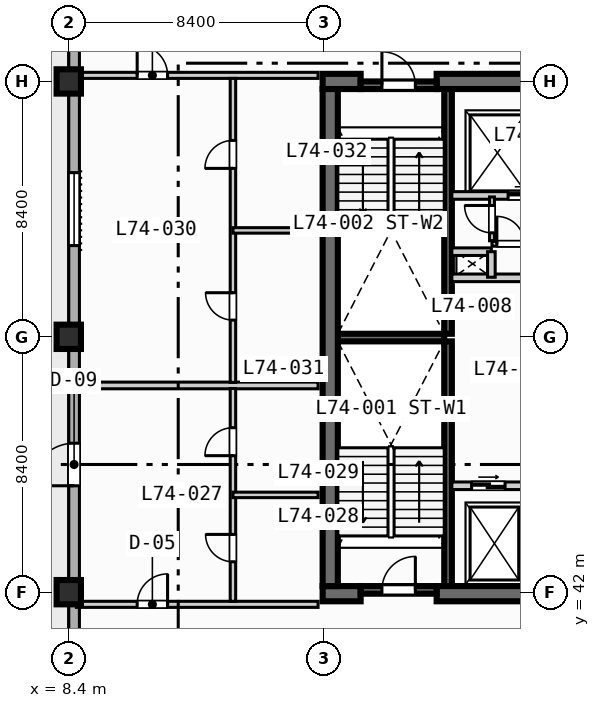
"""IFC4 building model, lengths in metres.
Left out: names, types, materials, properties, quantities, classifications, styles, units other than length and angle.
Written with IfcOpenShell. Run it as: python <this file> out.ifc"""

import sys

from ifc_helpers import new_model, si_unit, direction, frame, frame_2d, origin, origin_2d, place, context, subcontext, project, spatial, rectangle, extrude, element, fill, save


model = new_model("IFC4")
c1 = context("Model", 3, precision=1e-05, world=origin(), true_north=direction((0.0, 1.0)))
c2 = subcontext(c1, "Body", "Model", "MODEL_VIEW")
j1 = project(units=[si_unit("LENGTHUNIT", "METRE"), si_unit("PLANEANGLEUNIT", "RADIAN")], contexts=[c1])
p1 = place(None, origin())
s1 = spatial("IfcSite", under=j1, at=p1, CompositionType="ELEMENT")
p2 = place(p1, origin())
s2 = spatial("IfcBuilding", under=s1, at=p2, CompositionType="ELEMENT")
p3 = place(p2, frame((0.0, 0.0, 300.8)))
s3 = spatial("IfcBuildingStorey", under=s2, at=p3, CompositionType="ELEMENT", Elevation=300.8)
for number, where, z_axis, x_axis in (
    (1, (20.875, 42.2, 0.0), (0.0, 0.0, 1.0), (0.0, 1.0, 0.0)),
    (2, (20.875, 50.5, 0.0), (0.0, 0.0, 1.0), (0.0, 1.0, 0.0)),
):
    element("IfcWall", number, at=place(p3, frame(where, z_axis=z_axis, x_axis=x_axis)), inside=s3, PredefinedType="SOLIDWALL", context=c2, shape_type="SweptSolid", body=[
        extrude(rectangle(XDim=8.05, YDim=0.25, at=frame_2d((4.025, 0.0))), origin(), (0.0, 0.0, 1.0), 3.67),
    ])
p4 = place(p3, frame((17.25, 50.375, 0.0), z_axis=(0.0, 0.0, 1.0), x_axis=(1.0, 0.0, 0.0)))
e3 = element("IfcWall", 3, at=p4, inside=s3, PredefinedType="SOLIDWALL", context=c2, shape_type="SweptSolid", body=[
    extrude(rectangle(XDim=3.5, YDim=0.25, at=frame_2d((1.75, 0.0))), origin(), (0.0, 0.0, 1.0), 3.67),
])
p5 = place(p3, frame((16.75, 41.95, 0.0), z_axis=(0.0, 0.0, 1.0), x_axis=(1.0, 0.0, 0.0)))
e4 = element("IfcWall", 4, at=p5, inside=s3, PredefinedType="SHEAR", context=c2, shape_type="SweptSolid", body=[
    extrude(rectangle(XDim=1.25, YDim=0.5, at=frame_2d((0.625, 0.0))), origin(), (0.0, 0.0, 1.0), 3.67),
])
p6 = place(p3, frame((20.5, 41.95, 0.0), z_axis=(0.0, 0.0, 1.0), x_axis=(1.0, 0.0, 0.0)))
e5 = element("IfcWall", 5, at=p6, inside=s3, PredefinedType="SHEAR", context=c2, shape_type="SweptSolid", body=[
    extrude(rectangle(XDim=4.95, YDim=0.5, at=frame_2d((2.475, 0.0))), origin(), (0.0, 0.0, 1.0), 3.67),
])
p7 = place(p3, frame((16.75, 58.8, 0.0), z_axis=(0.0, 0.0, 1.0), x_axis=(1.0, 0.0, 0.0)))
e6 = element("IfcWall", 6, at=p7, inside=s3, PredefinedType="SHEAR", context=c2, shape_type="SweptSolid", body=[
    extrude(rectangle(XDim=1.25, YDim=0.5, at=frame_2d((0.625, 0.0))), origin(), (0.0, 0.0, 1.0), 3.67),
])
p8 = place(p3, frame((20.5, 58.8, 0.0), z_axis=(0.0, 0.0, 1.0), x_axis=(1.0, 0.0, 0.0)))
e7 = element("IfcWall", 7, at=p8, inside=s3, PredefinedType="SHEAR", context=c2, shape_type="SweptSolid", body=[
    extrude(rectangle(XDim=4.95, YDim=0.5, at=frame_2d((2.475, 0.0))), origin(), (0.0, 0.0, 1.0), 3.67),
])
p9 = place(p3, frame((17.0, 42.2, 0.0), z_axis=(0.0, 0.0, 1.0), x_axis=(0.0, 1.0, 0.0)))
e8 = element("IfcWall", 8, at=p9, inside=s3, PredefinedType="SHEAR", context=c2, shape_type="SweptSolid", body=[
    extrude(rectangle(XDim=16.35, YDim=0.5, at=frame_2d((8.175, 0.0))), origin(), (0.0, 0.0, 1.0), 3.67),
])
for number, where, z_axis, x_axis in (
    (9, (8.4, 42.0, 0.0), (0.0, 0.0, 1.0), (1.0, 0.0, 0.0)),
    (10, (8.4, 50.4, 0.0), (0.0, 0.0, 1.0), (1.0, 0.0, 0.0)),
    (11, (8.4, 58.8, 0.0), (0.0, 0.0, 1.0), (1.0, 0.0, 0.0)),
):
    element("IfcColumn", number, at=place(p3, frame(where, z_axis=z_axis, x_axis=x_axis)), inside=s3, PredefinedType="COLUMN", context=c2, shape_type="SweptSolid", body=[
        extrude(rectangle(XDim=0.8, YDim=0.8, at=origin_2d()), origin(), (0.0, 0.0, 1.0), 3.9),
    ])
p10 = place(p3, frame((8.575, 11.575, 0.0), z_axis=(0.0, 0.0, 1.0), x_axis=(0.0, 1.0, 0.0)))
e12 = element("IfcWall", 12, at=p10, inside=s3, PredefinedType="STANDARD", context=c2, shape_type="SweptSolid", body=[
    extrude(rectangle(XDim=60.85, YDim=0.35, at=frame_2d((30.425, 0.0))), origin(), (0.0, 0.0, 1.0), 3.67),
])
p11 = place(p10, frame((33.925, 0.0, 0.0)))
e13 = element("IfcOpeningElement", 13, at=p11, cuts=e12, PredefinedType="OPENING", context=c2, shape_type="SweptSolid", body=[
    extrude(rectangle(XDim=1.4, YDim=2.2, at=frame_2d((0.7, 1.1))), frame((0.0, 0.185, 0.0), z_axis=(0.0, -1.0, 0.0), x_axis=(1.0, 0.0, 0.0)), (0.0, 0.0, 1.0), 0.37),
])
p12 = place(p10, frame((25.025, 0.0, 0.85)))
e14 = element("IfcOpeningElement", 14, at=p12, cuts=e12, PredefinedType="OPENING", context=c2, shape_type="SweptSolid", body=[
    extrude(rectangle(XDim=2.4, YDim=1.95, at=frame_2d((1.2, 0.975))), frame((0.0, 0.185, 0.0), z_axis=(0.0, -1.0, 0.0), x_axis=(1.0, 0.0, 0.0)), (0.0, 0.0, 1.0), 0.37),
])
p13 = place(p10, frame((41.825, 0.0, 0.85)))
e15 = element("IfcOpeningElement", 15, at=p13, cuts=e12, PredefinedType="OPENING", context=c2, shape_type="SweptSolid", body=[
    extrude(rectangle(XDim=2.4, YDim=1.95, at=frame_2d((1.2, 0.975))), frame((0.0, 0.185, 0.0), z_axis=(0.0, -1.0, 0.0), x_axis=(1.0, 0.0, 0.0)), (0.0, 0.0, 1.0), 0.37),
])
p14 = place(p3, frame((18.0, 42.075, 0.0), z_axis=(0.0, 0.0, 1.0), x_axis=(1.0, 0.0, 0.0)))
e16 = element("IfcWall", 16, at=p14, inside=s3, PredefinedType="SOLIDWALL", context=c2, shape_type="SweptSolid", body=[
    extrude(rectangle(XDim=2.5, YDim=0.25, at=frame_2d((1.25, 0.0))), origin(), (0.0, 0.0, 1.0), 3.67),
])
p15 = place(p14, frame((0.7, 0.0, 0.0)))
e17 = element("IfcOpeningElement", 17, at=p15, cuts=e16, PredefinedType="OPENING", context=c2, shape_type="SweptSolid", body=[
    extrude(rectangle(XDim=1.1, YDim=2.15, at=frame_2d((0.55, 1.075))), frame((0.0, 0.135, 0.0), z_axis=(0.0, -1.0, 0.0), x_axis=(1.0, 0.0, 0.0)), (0.0, 0.0, 1.0), 0.27),
])
p16 = place(p3, frame((18.0, 58.675, 0.0), z_axis=(0.0, 0.0, 1.0), x_axis=(1.0, 0.0, 0.0)))
e18 = element("IfcWall", 18, at=p16, inside=s3, PredefinedType="SOLIDWALL", context=c2, shape_type="SweptSolid", body=[
    extrude(rectangle(XDim=2.5, YDim=0.25, at=frame_2d((1.25, 0.0))), origin(), (0.0, 0.0, 1.0), 3.67),
])
p17 = place(p16, frame((0.7, 0.0, 0.0)))
e19 = element("IfcOpeningElement", 19, at=p17, cuts=e18, PredefinedType="OPENING", context=c2, shape_type="SweptSolid", body=[
    extrude(rectangle(XDim=1.1, YDim=2.15, at=frame_2d((0.55, 1.075))), frame((0.0, 0.135, 0.0), z_axis=(0.0, -1.0, 0.0), x_axis=(1.0, 0.0, 0.0)), (0.0, 0.0, 1.0), 0.27),
])
p18 = place(p3, frame((21.0, 45.5, 0.0), z_axis=(0.0, 0.0, 1.0), x_axis=(1.0, 0.0, 0.0)))
e20 = element("IfcWall", 20, at=p18, inside=s3, PredefinedType="SOLIDWALL", context=c2, shape_type="SweptSolid", body=[
    extrude(rectangle(XDim=4.15, YDim=0.25, at=frame_2d((2.075, 0.0))), origin(), (0.0, 0.0, 1.0), 3.67),
])
p19 = place(p18, frame((0.65, 0.0, 0.0)))
e21 = element("IfcOpeningElement", 21, at=p19, cuts=e20, PredefinedType="OPENING", context=c2, shape_type="SweptSolid", body=[
    extrude(rectangle(XDim=1.1, YDim=2.15, at=frame_2d((0.55, 1.075))), frame((0.0, 0.135, 0.0), z_axis=(0.0, -1.0, 0.0), x_axis=(1.0, 0.0, 0.0)), (0.0, 0.0, 1.0), 0.27),
])
p20 = place(p3, frame((21.0, 52.34, 0.0), z_axis=(0.0, 0.0, 1.0), x_axis=(1.0, 0.0, 0.0)))
e22 = element("IfcWall", 22, at=p20, inside=s3, PredefinedType="SOLIDWALL", context=c2, shape_type="SweptSolid", body=[
    extrude(rectangle(XDim=3.95, YDim=0.25, at=frame_2d((1.975, 0.0))), origin(), (0.0, 0.0, 1.0), 3.67),
])
p21 = place(p3, frame((21.0, 55.05, 0.0), z_axis=(0.0, 0.0, 1.0), x_axis=(1.0, 0.0, 0.0)))
e23 = element("IfcWall", 23, at=p21, inside=s3, PredefinedType="SOLIDWALL", context=c2, shape_type="SweptSolid", body=[
    extrude(rectangle(XDim=4.15, YDim=0.25, at=frame_2d((2.075, 0.0))), origin(), (0.0, 0.0, 1.0), 3.67),
])
p22 = place(p21, frame((1.85, 0.0, 0.0)))
e24 = element("IfcOpeningElement", 24, at=p22, cuts=e23, PredefinedType="OPENING", context=c2, shape_type="SweptSolid", body=[
    extrude(rectangle(XDim=1.1, YDim=2.15, at=frame_2d((0.55, 1.075))), frame((0.0, 0.135, 0.0), z_axis=(0.0, -1.0, 0.0), x_axis=(1.0, 0.0, 0.0)), (0.0, 0.0, 1.0), 0.27),
])
p23 = place(p3, frame((21.0, 53.2, 0.0), z_axis=(0.0, 0.0, 1.0), x_axis=(1.0, 0.0, 0.0)))
e25 = element("IfcWall", 25, at=p23, inside=s3, PredefinedType="SOLIDWALL", context=c2, shape_type="SweptSolid", body=[
    extrude(rectangle(XDim=1.3, YDim=0.25, at=frame_2d((0.65, 0.0))), origin(), (0.0, 0.0, 1.0), 3.67),
])
p24 = place(p3, frame((22.3, 52.36, 0.0), z_axis=(0.0, 0.0, 1.0), x_axis=(0.0, 1.0, 0.0)))
e26 = element("IfcWall", 26, at=p24, inside=s3, PredefinedType="SOLIDWALL", context=c2, shape_type="SweptSolid", body=[
    extrude(rectangle(XDim=0.84, YDim=0.25, at=frame_2d((0.42, 0.0))), origin(), (0.0, 0.0, 1.0), 3.67),
])
p25 = place(p3, frame((22.32, 53.56, 0.0), z_axis=(0.0, 0.0, 1.0), x_axis=(0.0, 1.0, 0.0)))
e27 = element("IfcWall", 27, at=p25, inside=s3, PredefinedType="PARTITIONING", context=c2, shape_type="SweptSolid", body=[
    extrude(rectangle(XDim=1.44, YDim=0.16, at=frame_2d((0.72, 0.0))), origin(), (0.0, 0.0, 1.0), 3.67),
])
p26 = place(p25, frame((0.26, 0.0, 0.0)))
e28 = element("IfcOpeningElement", 28, at=p26, cuts=e27, PredefinedType="OPENING", context=c2, shape_type="SweptSolid", body=[
    extrude(rectangle(XDim=0.9, YDim=2.1, at=frame_2d((0.45, 1.05))), frame((0.0, 0.09, 0.0), z_axis=(0.0, -1.0, 0.0), x_axis=(1.0, 0.0, 0.0)), (0.0, 0.0, 1.0), 0.18),
])
p27 = place(p3, frame((22.32, 53.46, 0.0), z_axis=(0.0, 0.0, 1.0), x_axis=(1.0, 0.0, 0.0)))
e29 = element("IfcWall", 29, at=p27, inside=s3, PredefinedType="PARTITIONING", context=c2, shape_type="SweptSolid", body=[
    extrude(rectangle(XDim=2.36, YDim=0.16, at=frame_2d((1.18, 0.0))), origin(), (0.0, 0.0, 1.0), 3.67),
])
p28 = place(p27, frame((0.16, 0.0, 0.0)))
e30 = element("IfcOpeningElement", 30, at=p28, cuts=e29, PredefinedType="OPENING", context=c2, shape_type="SweptSolid", body=[
    extrude(rectangle(XDim=0.9, YDim=2.1, at=frame_2d((0.45, 1.05))), frame((0.0, 0.09, 0.0), z_axis=(0.0, -1.0, 0.0), x_axis=(1.0, 0.0, 0.0)), (0.0, 0.0, 1.0), 0.18),
])
p29 = place(p3, frame((8.65, 41.6, 0.0), z_axis=(0.0, 0.0, 1.0), x_axis=(1.0, 0.0, 0.0)))
e31 = element("IfcWall", 31, at=p29, inside=s3, PredefinedType="PARTITIONING", context=c2, shape_type="SweptSolid", body=[
    extrude(rectangle(XDim=7.95, YDim=0.2, at=frame_2d((3.975, 0.0))), origin(), (0.0, 0.0, 1.0), 3.67),
])
p30 = place(p29, frame((2.0, 0.0, 0.0)))
e32 = element("IfcOpeningElement", 32, at=p30, cuts=e31, PredefinedType="OPENING", context=c2, shape_type="SweptSolid", body=[
    extrude(rectangle(XDim=1.0, YDim=2.15, at=frame_2d((0.5, 1.075))), frame((0.0, 0.11, 0.0), z_axis=(0.0, -1.0, 0.0), x_axis=(1.0, 0.0, 0.0)), (0.0, 0.0, 1.0), 0.22),
])
p31 = place(p3, frame((8.65, 59.0, 0.0), z_axis=(0.0, 0.0, 1.0), x_axis=(1.0, 0.0, 0.0)))
e33 = element("IfcWall", 33, at=p31, inside=s3, PredefinedType="PARTITIONING", context=c2, shape_type="SweptSolid", body=[
    extrude(rectangle(XDim=7.95, YDim=0.2, at=frame_2d((3.975, 0.0))), origin(), (0.0, 0.0, 1.0), 3.07),
])
p32 = place(p31, frame((2.0, 0.0, 0.0)))
e34 = element("IfcOpeningElement", 34, at=p32, cuts=e33, PredefinedType="OPENING", context=c2, shape_type="SweptSolid", body=[
    extrude(rectangle(XDim=1.0, YDim=2.15, at=frame_2d((0.5, 1.075))), frame((0.0, 0.11, 0.0), z_axis=(0.0, -1.0, 0.0), x_axis=(1.0, 0.0, 0.0)), (0.0, 0.0, 1.0), 0.22),
])
p33 = place(p3, frame((8.65, 48.8, 0.0), z_axis=(0.0, 0.0, 1.0), x_axis=(1.0, 0.0, 0.0)))
e35 = element("IfcWall", 35, at=p33, inside=s3, PredefinedType="PARTITIONING", context=c2, shape_type="SweptSolid", body=[
    extrude(rectangle(XDim=7.95, YDim=0.22, at=frame_2d((3.975, 0.0))), origin(), (0.0, 0.0, 1.0), 3.67),
])
p34 = place(p3, frame((13.8, 41.7, 0.0), z_axis=(0.0, 0.0, 1.0), x_axis=(0.0, 1.0, 0.0)))
e36 = element("IfcWall", 36, at=p34, inside=s3, PredefinedType="PLUMBINGWALL", context=c2, shape_type="SweptSolid", body=[
    extrude(rectangle(XDim=7.0, YDim=0.18, at=frame_2d((3.5, 0.0))), origin(), (0.0, 0.0, 1.0), 3.67),
])
p35 = place(p34, frame((1.3, 0.0, 0.0)))
e37 = element("IfcOpeningElement", 37, at=p35, cuts=e36, PredefinedType="OPENING", context=c2, shape_type="SweptSolid", body=[
    extrude(rectangle(XDim=0.9, YDim=2.1, at=frame_2d((0.45, 1.05))), frame((0.0, 0.1, 0.0), z_axis=(0.0, -1.0, 0.0), x_axis=(1.0, 0.0, 0.0)), (0.0, 0.0, 1.0), 0.2),
])
p36 = place(p34, frame((4.79, 0.0, 0.0)))
e38 = element("IfcOpeningElement", 38, at=p36, cuts=e36, PredefinedType="OPENING", context=c2, shape_type="SweptSolid", body=[
    extrude(rectangle(XDim=0.92, YDim=2.1, at=frame_2d((0.46, 1.05))), frame((0.0, 0.1, 0.0), z_axis=(0.0, -1.0, 0.0), x_axis=(1.0, 0.0, 0.0)), (0.0, 0.0, 1.0), 0.2),
])
p37 = place(p3, frame((13.8, 45.2, 0.0), z_axis=(0.0, 0.0, 1.0), x_axis=(1.0, 0.0, 0.0)))
e39 = element("IfcWall", 39, at=p37, inside=s3, PredefinedType="PLUMBINGWALL", context=c2, shape_type="SweptSolid", body=[
    extrude(rectangle(XDim=2.8, YDim=0.18, at=frame_2d((1.4, 0.0))), origin(), (0.0, 0.0, 1.0), 3.67),
])
p38 = place(p3, frame((13.8, 48.9, 0.0), z_axis=(0.0, 0.0, 1.0), x_axis=(0.0, 1.0, 0.0)))
e40 = element("IfcWall", 40, at=p38, inside=s3, PredefinedType="PLUMBINGWALL", context=c2, shape_type="SweptSolid", body=[
    extrude(rectangle(XDim=10.0, YDim=0.18, at=frame_2d((5.0, 0.0))), origin(), (0.0, 0.0, 1.0), 3.67),
])
p39 = place(p38, frame((2.05, 0.0, 0.0)))
e41 = element("IfcOpeningElement", 41, at=p39, cuts=e40, PredefinedType="OPENING", context=c2, shape_type="SweptSolid", body=[
    extrude(rectangle(XDim=0.9, YDim=2.1, at=frame_2d((0.45, 1.05))), frame((0.0, 0.1, 0.0), z_axis=(0.0, -1.0, 0.0), x_axis=(1.0, 0.0, 0.0)), (0.0, 0.0, 1.0), 0.2),
])
p40 = place(p38, frame((7.04, 0.0, 0.0)))
e42 = element("IfcOpeningElement", 42, at=p40, cuts=e40, PredefinedType="OPENING", context=c2, shape_type="SweptSolid", body=[
    extrude(rectangle(XDim=0.92, YDim=2.1, at=frame_2d((0.46, 1.05))), frame((0.0, 0.1, 0.0), z_axis=(0.0, -1.0, 0.0), x_axis=(1.0, 0.0, 0.0)), (0.0, 0.0, 1.0), 0.2),
])
p41 = place(p3, frame((13.8, 53.9, 0.0), z_axis=(0.0, 0.0, 1.0), x_axis=(1.0, 0.0, 0.0)))
e43 = element("IfcWall", 43, at=p41, inside=s3, PredefinedType="PLUMBINGWALL", context=c2, shape_type="SweptSolid", body=[
    extrude(rectangle(XDim=2.8, YDim=0.18, at=frame_2d((1.4, 0.0))), origin(), (0.0, 0.0, 1.0), 3.67),
])
p42 = place(p11, origin())
e44 = element("IfcDoor", 44, at=p42, inside=s3, OperationType="SINGLE_SWING_LEFT", PredefinedType="DOOR", context=c2, shape_type="SweptSolid", body=[
    extrude(rectangle(XDim=1.4, YDim=2.2, at=frame_2d((0.7, 1.1))), frame((0.0, 0.025, 0.0), z_axis=(0.0, -1.0, 0.0), x_axis=(1.0, 0.0, 0.0)), (0.0, 0.0, 1.0), 0.05),
])
fill(e13, e44)
p43 = place(p13, origin())
e45 = element("IfcWindow", 45, at=p43, inside=s3, PartitioningType="SINGLE_PANEL", PredefinedType="WINDOW", context=c2, shape_type="SweptSolid", body=[
    extrude(rectangle(XDim=2.4, YDim=1.95, at=frame_2d((1.2, 0.975))), frame((0.0, 0.03, 0.0), z_axis=(0.0, -1.0, 0.0), x_axis=(1.0, 0.0, 0.0)), (0.0, 0.0, 1.0), 0.06),
])
fill(e15, e45)
p44 = place(p15, origin())
e46 = element("IfcDoor", 46, at=p44, inside=s3, OperationType="SINGLE_SWING_RIGHT", PredefinedType="DOOR", context=c2, shape_type="SweptSolid", body=[
    extrude(rectangle(XDim=1.1, YDim=2.15, at=frame_2d((0.55, 1.075))), frame((0.0, 0.025, 0.0), z_axis=(0.0, -1.0, 0.0), x_axis=(1.0, 0.0, 0.0)), (0.0, 0.0, 1.0), 0.05),
])
fill(e17, e46)
p45 = place(p17, origin())
e47 = element("IfcDoor", 47, at=p45, inside=s3, OperationType="SINGLE_SWING_LEFT", PredefinedType="DOOR", context=c2, shape_type="SweptSolid", body=[
    extrude(rectangle(XDim=1.1, YDim=2.15, at=frame_2d((0.55, 1.075))), frame((0.0, 0.025, 0.0), z_axis=(0.0, -1.0, 0.0), x_axis=(1.0, 0.0, 0.0)), (0.0, 0.0, 1.0), 0.05),
])
fill(e19, e47)
p46 = place(p19, origin())
e48 = element("IfcDoor", 48, at=p46, inside=s3, OperationType="SLIDING_TO_LEFT", PredefinedType="DOOR", context=c2, shape_type="SweptSolid", body=[
    extrude(rectangle(XDim=1.1, YDim=2.15, at=frame_2d((0.55, 1.075))), frame((0.0, 0.025, 0.0), z_axis=(0.0, -1.0, 0.0), x_axis=(1.0, 0.0, 0.0)), (0.0, 0.0, 1.0), 0.05),
])
fill(e21, e48)
p47 = place(p22, origin())
e49 = element("IfcDoor", 49, at=p47, inside=s3, OperationType="SLIDING_TO_LEFT", PredefinedType="DOOR", context=c2, shape_type="SweptSolid", body=[
    extrude(rectangle(XDim=1.1, YDim=2.15, at=frame_2d((0.55, 1.075))), frame((0.0, 0.025, 0.0), z_axis=(0.0, -1.0, 0.0), x_axis=(1.0, 0.0, 0.0)), (0.0, 0.0, 1.0), 0.05),
])
fill(e24, e49)
p48 = place(p26, origin())
e50 = element("IfcDoor", 50, at=p48, inside=s3, OperationType="SINGLE_SWING_RIGHT", PredefinedType="DOOR", context=c2, shape_type="SweptSolid", body=[
    extrude(rectangle(XDim=0.9, YDim=2.1, at=frame_2d((0.45, 1.05))), frame((0.0, 0.025, 0.0), z_axis=(0.0, -1.0, 0.0), x_axis=(1.0, 0.0, 0.0)), (0.0, 0.0, 1.0), 0.05),
])
fill(e28, e50)
p49 = place(p28, origin())
e51 = element("IfcDoor", 51, at=p49, inside=s3, OperationType="SINGLE_SWING_LEFT", PredefinedType="DOOR", context=c2, shape_type="SweptSolid", body=[
    extrude(rectangle(XDim=0.9, YDim=2.1, at=frame_2d((0.45, 1.05))), frame((0.0, 0.025, 0.0), z_axis=(0.0, -1.0, 0.0), x_axis=(1.0, 0.0, 0.0)), (0.0, 0.0, 1.0), 0.05),
])
fill(e30, e51)
p50 = place(p30, origin())
e52 = element("IfcDoor", 52, at=p50, inside=s3, OperationType="SINGLE_SWING_RIGHT", PredefinedType="DOOR", context=c2, shape_type="SweptSolid", body=[
    extrude(rectangle(XDim=1.0, YDim=2.15, at=frame_2d((0.5, 1.075))), frame((0.0, 0.025, 0.0), z_axis=(0.0, -1.0, 0.0), x_axis=(1.0, 0.0, 0.0)), (0.0, 0.0, 1.0), 0.05),
])
fill(e32, e52)
p51 = place(p32, origin())
e53 = element("IfcDoor", 53, at=p51, inside=s3, OperationType="SINGLE_SWING_LEFT", PredefinedType="DOOR", context=c2, shape_type="SweptSolid", body=[
    extrude(rectangle(XDim=1.0, YDim=2.15, at=frame_2d((0.5, 1.075))), frame((0.0, 0.025, 0.0), z_axis=(0.0, -1.0, 0.0), x_axis=(1.0, 0.0, 0.0)), (0.0, 0.0, 1.0), 0.05),
])
fill(e34, e53)
p52 = place(p35, origin())
e54 = element("IfcDoor", 54, at=p52, inside=s3, OperationType="SINGLE_SWING_RIGHT", PredefinedType="DOOR", context=c2, shape_type="SweptSolid", body=[
    extrude(rectangle(XDim=0.9, YDim=2.1, at=frame_2d((0.45, 1.05))), frame((0.0, 0.025, 0.0), z_axis=(0.0, -1.0, 0.0), x_axis=(1.0, 0.0, 0.0)), (0.0, 0.0, 1.0), 0.05),
])
fill(e37, e54)
p53 = place(p36, origin())
e55 = element("IfcDoor", 55, at=p53, inside=s3, OperationType="SINGLE_SWING_LEFT", PredefinedType="DOOR", context=c2, shape_type="SweptSolid", body=[
    extrude(rectangle(XDim=0.92, YDim=2.1, at=frame_2d((0.46, 1.05))), frame((0.0, 0.025, 0.0), z_axis=(0.0, -1.0, 0.0), x_axis=(1.0, 0.0, 0.0)), (0.0, 0.0, 1.0), 0.05),
])
fill(e38, e55)
p54 = place(p39, origin())
e56 = element("IfcDoor", 56, at=p54, inside=s3, OperationType="SINGLE_SWING_RIGHT", PredefinedType="DOOR", context=c2, shape_type="SweptSolid", body=[
    extrude(rectangle(XDim=0.9, YDim=2.1, at=frame_2d((0.45, 1.05))), frame((0.0, 0.025, 0.0), z_axis=(0.0, -1.0, 0.0), x_axis=(1.0, 0.0, 0.0)), (0.0, 0.0, 1.0), 0.05),
])
fill(e41, e56)
p55 = place(p40, origin())
e57 = element("IfcDoor", 57, at=p55, inside=s3, OperationType="SINGLE_SWING_LEFT", PredefinedType="DOOR", context=c2, shape_type="SweptSolid", body=[
    extrude(rectangle(XDim=0.92, YDim=2.1, at=frame_2d((0.46, 1.05))), frame((0.0, 0.025, 0.0), z_axis=(0.0, -1.0, 0.0), x_axis=(1.0, 0.0, 0.0)), (0.0, 0.0, 1.0), 0.05),
])
fill(e42, e57)
save(model, sys.argv[1])
